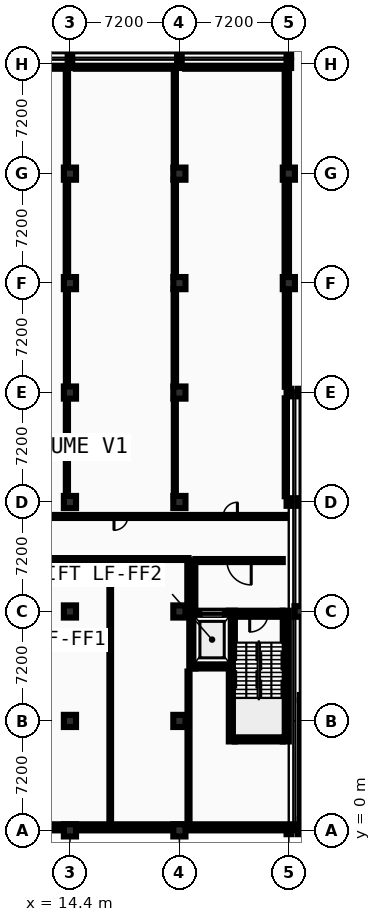
"""IFC4 building model, lengths in metres.
Left out: names, types, materials, properties, quantities, classifications, styles, units other than length and angle.
Written with IfcOpenShell. Run it as: python <this file> out.ifc"""

import sys

from ifc_helpers import new_model, si_unit, direction, frame, frame_2d, origin, origin_2d, place, context, subcontext, project, spatial, rectangle, i_section, extrude, element, fill, save


model = new_model("IFC4")
c1 = context("Model", 3, precision=1e-05, world=origin(), true_north=direction((0.0, 1.0)))
c2 = subcontext(c1, "Body", "Model", "MODEL_VIEW")
j1 = project(units=[si_unit("LENGTHUNIT", "METRE"), si_unit("PLANEANGLEUNIT", "RADIAN")], contexts=[c1])
p1 = place(None, origin())
s1 = spatial("IfcSite", under=j1, at=p1, CompositionType="ELEMENT")
p2 = place(p1, origin())
s2 = spatial("IfcBuilding", under=s1, at=p2, CompositionType="ELEMENT")
p3 = place(p2, frame((0.0, 0.0, -4.8)))
s3 = spatial("IfcBuildingStorey", under=s2, at=p3, CompositionType="ELEMENT", Elevation=-4.8)
for number, where, z_axis, x_axis in (
    (1, (14.4, 0.0, 0.0), (0.0, 0.0, 1.0), (1.0, 0.0, 0.0)),
    (2, (14.4, 7.2, 0.0), (0.0, 0.0, 1.0), (1.0, 0.0, 0.0)),
    (3, (14.4, 14.4, 0.0), (0.0, 0.0, 1.0), (1.0, 0.0, 0.0)),
    (4, (14.4, 21.6, 0.0), (0.0, 0.0, 1.0), (1.0, 0.0, 0.0)),
    (5, (14.4, 28.8, 0.0), (0.0, 0.0, 1.0), (1.0, 0.0, 0.0)),
    (6, (14.4, 36.0, 0.0), (0.0, 0.0, 1.0), (1.0, 0.0, 0.0)),
    (7, (14.4, 43.2, 0.0), (0.0, 0.0, 1.0), (1.0, 0.0, 0.0)),
):
    element("IfcColumn", number, at=place(p3, frame(where, z_axis=z_axis, x_axis=x_axis)), inside=s3, PredefinedType="COLUMN", context=c2, shape_type="SweptSolid", body=[
        extrude(rectangle(XDim=0.8, YDim=0.8, at=origin_2d()), origin(), (0.0, 0.0, 1.0), 4.8),
    ])
for number, where, z_axis, x_axis in (
    (8, (14.4, 50.4, 0.0), (0.0, 0.0, 1.0), (1.0, 0.0, 0.0)),
    (9, (14.4, 51.12, 0.0), (0.0, 0.0, 1.0), (1.0, 0.0, 0.0)),
):
    element("IfcColumn", number, at=place(p3, frame(where, z_axis=z_axis, x_axis=x_axis)), inside=s3, PredefinedType="COLUMN", context=c2, shape_type="SweptSolid", body=[
        extrude(i_section(OverallWidth=0.3, OverallDepth=0.5, WebThickness=0.014, FlangeThickness=0.028, FilletRadius=0.027, at=origin_2d()), origin(), (0.0, 0.0, 1.0), 4.8),
    ])
for number, where, z_axis, x_axis in (
    (10, (21.6, 0.0, 0.0), (0.0, 0.0, 1.0), (1.0, 0.0, 0.0)),
    (11, (21.6, 7.2, 0.0), (0.0, 0.0, 1.0), (1.0, 0.0, 0.0)),
    (12, (21.6, 14.4, 0.0), (0.0, 0.0, 1.0), (1.0, 0.0, 0.0)),
    (13, (21.6, 21.6, 0.0), (0.0, 0.0, 1.0), (1.0, 0.0, 0.0)),
    (14, (21.6, 28.8, 0.0), (0.0, 0.0, 1.0), (1.0, 0.0, 0.0)),
    (15, (21.6, 36.0, 0.0), (0.0, 0.0, 1.0), (1.0, 0.0, 0.0)),
    (16, (21.6, 43.2, 0.0), (0.0, 0.0, 1.0), (1.0, 0.0, 0.0)),
):
    element("IfcColumn", number, at=place(p3, frame(where, z_axis=z_axis, x_axis=x_axis)), inside=s3, PredefinedType="COLUMN", context=c2, shape_type="SweptSolid", body=[
        extrude(rectangle(XDim=0.8, YDim=0.8, at=origin_2d()), origin(), (0.0, 0.0, 1.0), 4.8),
    ])
for number, where, z_axis, x_axis in (
    (17, (21.6, 50.4, 0.0), (0.0, 0.0, 1.0), (1.0, 0.0, 0.0)),
    (18, (21.6, 51.12, 0.0), (0.0, 0.0, 1.0), (1.0, 0.0, 0.0)),
    (19, (28.8, 0.0, 0.0), (0.0, 0.0, 1.0), (1.0, 0.0, 0.0)),
    (20, (28.8, 21.6, 0.0), (0.0, 0.0, 1.0), (1.0, 0.0, 0.0)),
    (21, (28.8, 28.8, 0.0), (0.0, 0.0, 1.0), (1.0, 0.0, 0.0)),
):
    element("IfcColumn", number, at=place(p3, frame(where, z_axis=z_axis, x_axis=x_axis)), inside=s3, PredefinedType="COLUMN", context=c2, shape_type="SweptSolid", body=[
        extrude(i_section(OverallWidth=0.3, OverallDepth=0.5, WebThickness=0.014, FlangeThickness=0.028, FilletRadius=0.027, at=origin_2d()), origin(), (0.0, 0.0, 1.0), 4.8),
    ])
for number, where, z_axis, x_axis in (
    (22, (28.8, 36.0, 0.0), (0.0, 0.0, 1.0), (1.0, 0.0, 0.0)),
    (23, (28.8, 43.2, 0.0), (0.0, 0.0, 1.0), (1.0, 0.0, 0.0)),
):
    element("IfcColumn", number, at=place(p3, frame(where, z_axis=z_axis, x_axis=x_axis)), inside=s3, PredefinedType="COLUMN", context=c2, shape_type="SweptSolid", body=[
        extrude(rectangle(XDim=0.8, YDim=0.8, at=origin_2d()), origin(), (0.0, 0.0, 1.0), 4.8),
    ])
for number, where, z_axis, x_axis in (
    (24, (28.8, 50.4, 0.0), (0.0, 0.0, 1.0), (1.0, 0.0, 0.0)),
    (25, (28.8, 51.12, 0.0), (0.0, 0.0, 1.0), (1.0, 0.0, 0.0)),
    (26, (29.52, 0.0, 0.0), (0.0, 0.0, 1.0), (1.0, 0.0, 0.0)),
):
    element("IfcColumn", number, at=place(p3, frame(where, z_axis=z_axis, x_axis=x_axis)), inside=s3, PredefinedType="COLUMN", context=c2, shape_type="SweptSolid", body=[
        extrude(i_section(OverallWidth=0.3, OverallDepth=0.5, WebThickness=0.014, FlangeThickness=0.028, FilletRadius=0.027, at=origin_2d()), origin(), (0.0, 0.0, 1.0), 4.8),
    ])
p4 = place(p3, frame((29.52, 14.4, 0.0), z_axis=(0.0, 0.0, 1.0), x_axis=(1.0, 0.0, 0.0)))
e27 = element("IfcColumn", 27, at=p4, inside=s3, PredefinedType="COLUMN", context=c2, shape_type="SweptSolid", body=[
    extrude(rectangle(XDim=0.7, YDim=0.7, at=origin_2d()), origin(), (0.0, 0.0, 1.0), 4.8),
])
for number, where, z_axis, x_axis in (
    (28, (29.52, 21.6, 0.0), (0.0, 0.0, 1.0), (1.0, 0.0, 0.0)),
    (29, (29.52, 28.8, 0.0), (0.0, 0.0, 1.0), (1.0, 0.0, 0.0)),
):
    element("IfcColumn", number, at=place(p3, frame(where, z_axis=z_axis, x_axis=x_axis)), inside=s3, PredefinedType="COLUMN", context=c2, shape_type="SweptSolid", body=[
        extrude(i_section(OverallWidth=0.3, OverallDepth=0.5, WebThickness=0.014, FlangeThickness=0.028, FilletRadius=0.027, at=origin_2d()), origin(), (0.0, 0.0, 1.0), 4.8),
    ])
p5 = place(p3, frame((0.0, 0.2, 0.0), z_axis=(0.0, 0.0, 1.0), x_axis=(1.0, 0.0, 0.0)))
e30 = element("IfcWall", 30, at=p5, inside=s3, PredefinedType="USERDEFINED", context=c2, shape_type="SweptSolid", body=[
    extrude(rectangle(XDim=86.4, YDim=0.4, at=frame_2d((43.2, 0.0))), origin(), (0.0, 0.0, 1.0), 4.545),
])
p6 = place(p3, frame((25.25, 6.05, 0.0), z_axis=(0.0, 0.0, 1.0), x_axis=(1.0, 0.0, 0.0)))
e31 = element("IfcWall", 31, at=p6, inside=s3, PredefinedType="SHEAR", context=c2, shape_type="SweptSolid", body=[
    extrude(rectangle(XDim=3.15, YDim=0.4, at=frame_2d((1.575, 0.0))), origin(), (0.0, 0.0, 1.0), 4.545),
])
p7 = place(p3, frame((25.25, 14.25, 0.0), z_axis=(0.0, 0.0, 1.0), x_axis=(1.0, 0.0, 0.0)))
e32 = element("IfcWall", 32, at=p7, inside=s3, PredefinedType="SHEAR", context=c2, shape_type="SweptSolid", body=[
    extrude(rectangle(XDim=3.15, YDim=0.4, at=frame_2d((1.575, 0.0))), origin(), (0.0, 0.0, 1.0), 4.545),
])
p8 = place(p7, frame((0.975, 0.0, 0.0)))
e33 = element("IfcOpeningElement", 33, at=p8, cuts=e32, PredefinedType="OPENING", context=c2, shape_type="SweptSolid", body=[
    extrude(rectangle(XDim=1.2, YDim=2.15, at=frame_2d((0.6, 1.075))), frame((0.0, 0.21, 0.0), z_axis=(0.0, -1.0, 0.0), x_axis=(1.0, 0.0, 0.0)), (0.0, 0.0, 1.0), 0.42),
])
for number, where, z_axis, x_axis in (
    (34, (25.05, 5.85, 0.0), (0.0, 0.0, 1.0), (0.0, 1.0, 0.0)),
    (35, (28.6, 5.85, 0.0), (0.0, 0.0, 1.0), (0.0, 1.0, 0.0)),
):
    element("IfcWall", number, at=place(p3, frame(where, z_axis=z_axis, x_axis=x_axis)), inside=s3, PredefinedType="SHEAR", context=c2, shape_type="SweptSolid", body=[
        extrude(rectangle(XDim=8.6, YDim=0.4, at=frame_2d((4.3, 0.0))), origin(), (0.0, 0.0, 1.0), 4.545),
    ])
p9 = place(p3, frame((22.65, 10.85, 0.0), z_axis=(0.0, 0.0, 1.0), x_axis=(1.0, 0.0, 0.0)))
e36 = element("IfcWall", 36, at=p9, inside=s3, PredefinedType="SHEAR", context=c2, shape_type="SweptSolid", body=[
    extrude(rectangle(XDim=2.2, YDim=0.4, at=frame_2d((1.1, 0.0))), origin(), (0.0, 0.0, 1.0), 4.545),
])
p10 = place(p3, frame((22.65, 14.25, 0.0), z_axis=(0.0, 0.0, 1.0), x_axis=(1.0, 0.0, 0.0)))
e37 = element("IfcWall", 37, at=p10, inside=s3, PredefinedType="SHEAR", context=c2, shape_type="SweptSolid", body=[
    extrude(rectangle(XDim=2.2, YDim=0.4, at=frame_2d((1.1, 0.0))), origin(), (0.0, 0.0, 1.0), 4.545),
])
p11 = place(p10, frame((0.4, 0.0, 0.0)))
e38 = element("IfcOpeningElement", 38, at=p11, cuts=e37, PredefinedType="OPENING", context=c2, shape_type="SweptSolid", body=[
    extrude(rectangle(XDim=1.4, YDim=2.2, at=frame_2d((0.7, 1.1))), frame((0.0, 0.21, 0.0), z_axis=(0.0, -1.0, 0.0), x_axis=(1.0, 0.0, 0.0)), (0.0, 0.0, 1.0), 0.42),
])
p12 = place(p3, frame((22.45, 10.65, 0.0), z_axis=(0.0, 0.0, 1.0), x_axis=(0.0, 1.0, 0.0)))
e39 = element("IfcWall", 39, at=p12, inside=s3, PredefinedType="SHEAR", context=c2, shape_type="SweptSolid", body=[
    extrude(rectangle(XDim=3.8, YDim=0.4, at=frame_2d((1.9, 0.0))), origin(), (0.0, 0.0, 1.0), 4.545),
])
p13 = place(p3, frame((22.65, 17.75, 0.0), z_axis=(0.0, 0.0, 1.0), x_axis=(1.0, 0.0, 0.0)))
e40 = element("IfcWall", 40, at=p13, inside=s3, PredefinedType="PARTITIONING", context=c2, shape_type="SweptSolid", body=[
    extrude(rectangle(XDim=5.75, YDim=0.2, at=frame_2d((2.875, 0.0))), origin(), (0.0, 0.0, 1.0), 4.545),
])
p14 = place(p13, frame((2.075, 0.0, 0.0)))
e41 = element("IfcOpeningElement", 41, at=p14, cuts=e40, PredefinedType="OPENING", context=c2, shape_type="SweptSolid", body=[
    extrude(rectangle(XDim=1.6, YDim=2.2, at=frame_2d((0.8, 1.1))), frame((0.0, 0.11, 0.0), z_axis=(0.0, -1.0, 0.0), x_axis=(1.0, 0.0, 0.0)), (0.0, 0.0, 1.0), 0.22),
])
p15 = place(p3, frame((22.55, 14.45, 0.0), z_axis=(0.0, 0.0, 1.0), x_axis=(0.0, 1.0, 0.0)))
e42 = element("IfcWall", 42, at=p15, inside=s3, PredefinedType="PARTITIONING", context=c2, shape_type="SweptSolid", body=[
    extrude(rectangle(XDim=3.2, YDim=0.2, at=frame_2d((1.6, 0.0))), origin(), (0.0, 0.0, 1.0), 4.545),
])
p16 = place(p3, frame((29.52, 0.575, 0.0), z_axis=(0.0, 0.0, 1.0), x_axis=(1.0, 0.0, 0.0)))
e43 = element("IfcWall", 43, at=p16, inside=s3, PredefinedType="SHEAR", context=c2, shape_type="SweptSolid", body=[
    extrude(rectangle(XDim=3.85, YDim=0.35, at=frame_2d((1.925, 0.0))), origin(), (0.0, 0.0, 1.0), 4.545),
])
p17 = place(p3, frame((29.52, 8.725, 0.0), z_axis=(0.0, 0.0, 1.0), x_axis=(1.0, 0.0, 0.0)))
e44 = element("IfcWall", 44, at=p17, inside=s3, PredefinedType="SHEAR", context=c2, shape_type="SweptSolid", body=[
    extrude(rectangle(XDim=3.85, YDim=0.35, at=frame_2d((1.925, 0.0))), origin(), (0.0, 0.0, 1.0), 4.545),
])
p18 = place(p17, frame((1.375, 0.0, 0.0)))
e45 = element("IfcOpeningElement", 45, at=p18, cuts=e44, PredefinedType="OPENING", context=c2, shape_type="SweptSolid", body=[
    extrude(rectangle(XDim=1.1, YDim=2.15, at=frame_2d((0.55, 1.075))), frame((0.0, 0.185, 0.0), z_axis=(0.0, -1.0, 0.0), x_axis=(1.0, 0.0, 0.0)), (0.0, 0.0, 1.0), 0.37),
])
p19 = place(p3, frame((29.695, 0.75, 0.0), z_axis=(0.0, 0.0, 1.0), x_axis=(0.0, 1.0, 0.0)))
e46 = element("IfcWall", 46, at=p19, inside=s3, PredefinedType="SHEAR", context=c2, shape_type="SweptSolid", body=[
    extrude(rectangle(XDim=7.8, YDim=0.35, at=frame_2d((3.9, 0.0))), origin(), (0.0, 0.0, 1.0), 4.545),
])
p20 = place(p3, frame((9.45, 17.85, 0.0), z_axis=(0.0, 0.0, 1.0), x_axis=(1.0, 0.0, 0.0)))
e47 = element("IfcWall", 47, at=p20, inside=s3, PredefinedType="PARTITIONING", context=c2, shape_type="SweptSolid", body=[
    extrude(rectangle(XDim=12.75, YDim=0.125, at=frame_2d((6.375, 0.0))), origin(), (0.0, 0.0, 1.0), 4.545),
])
p21 = place(p20, frame((1.225, 0.0, 0.0)))
e48 = element("IfcOpeningElement", 48, at=p21, cuts=e47, PredefinedType="OPENING", context=c2, shape_type="SweptSolid", body=[
    extrude(rectangle(XDim=1.0, YDim=2.1, at=frame_2d((0.5, 1.05))), frame((0.0, 0.073, 0.0), z_axis=(0.0, -1.0, 0.0), x_axis=(1.0, 0.0, 0.0)), (0.0, 0.0, 1.0), 0.145),
])
p22 = place(p20, frame((6.25, 0.0, 0.0)))
e49 = element("IfcOpeningElement", 49, at=p22, cuts=e47, PredefinedType="OPENING", context=c2, shape_type="SweptSolid", body=[
    extrude(rectangle(XDim=0.9, YDim=2.1, at=frame_2d((0.45, 1.05))), frame((0.0, 0.073, 0.0), z_axis=(0.0, -1.0, 0.0), x_axis=(1.0, 0.0, 0.0)), (0.0, 0.0, 1.0), 0.145),
])
p23 = place(p20, frame((8.05, 0.0, 0.0)))
e50 = element("IfcOpeningElement", 50, at=p23, cuts=e47, PredefinedType="OPENING", context=c2, shape_type="SweptSolid", body=[
    extrude(rectangle(XDim=0.88, YDim=2.04, at=frame_2d((0.44, 1.02))), frame((0.0, 0.073, 0.0), z_axis=(0.0, -1.0, 0.0), x_axis=(1.0, 0.0, 0.0)), (0.0, 0.0, 1.0), 0.145),
])
p24 = place(p3, frame((0.42, 20.65, 0.0), z_axis=(0.0, 0.0, 1.0), x_axis=(1.0, 0.0, 0.0)))
e51 = element("IfcWall", 51, at=p24, inside=s3, PredefinedType="PARTITIONING", context=c2, shape_type="SweptSolid", body=[
    extrude(rectangle(XDim=28.18, YDim=0.2, at=frame_2d((14.09, 0.0))), origin(), (0.0, 0.0, 1.0), 4.545),
])
p25 = place(p24, frame((0.665, 0.0, 0.0)))
e52 = element("IfcOpeningElement", 52, at=p25, cuts=e51, PredefinedType="OPENING", context=c2, shape_type="SweptSolid", body=[
    extrude(rectangle(XDim=1.8, YDim=2.3, at=frame_2d((0.9, 1.15))), frame((0.0, 0.11, 0.0), z_axis=(0.0, -1.0, 0.0), x_axis=(1.0, 0.0, 0.0)), (0.0, 0.0, 1.0), 0.22),
])
p26 = place(p24, frame((9.48, 0.0, 0.0)))
e53 = element("IfcOpeningElement", 53, at=p26, cuts=e51, PredefinedType="OPENING", context=c2, shape_type="SweptSolid", body=[
    extrude(rectangle(XDim=1.8, YDim=2.3, at=frame_2d((0.9, 1.15))), frame((0.0, 0.11, 0.0), z_axis=(0.0, -1.0, 0.0), x_axis=(1.0, 0.0, 0.0)), (0.0, 0.0, 1.0), 0.22),
])
p27 = place(p24, frame((3.58, 0.0, 0.0)))
e54 = element("IfcOpeningElement", 54, at=p27, cuts=e51, PredefinedType="OPENING", context=c2, shape_type="SweptSolid", body=[
    extrude(rectangle(XDim=1.8, YDim=2.3, at=frame_2d((0.9, 1.15))), frame((0.0, 0.11, 0.0), z_axis=(0.0, -1.0, 0.0), x_axis=(1.0, 0.0, 0.0)), (0.0, 0.0, 1.0), 0.22),
])
p28 = place(p24, frame((16.877, 0.0, 0.0)))
e55 = element("IfcOpeningElement", 55, at=p28, cuts=e51, PredefinedType="OPENING", context=c2, shape_type="SweptSolid", body=[
    extrude(rectangle(XDim=0.906, YDim=2.04, at=frame_2d((0.453, 1.02))), frame((0.0, 0.11, 0.0), z_axis=(0.0, -1.0, 0.0), x_axis=(1.0, 0.0, 0.0)), (0.0, 0.0, 1.0), 0.22),
])
p29 = place(p24, frame((24.064, 0.0, 0.0)))
e56 = element("IfcOpeningElement", 56, at=p29, cuts=e51, PredefinedType="OPENING", context=c2, shape_type="SweptSolid", body=[
    extrude(rectangle(XDim=0.932, YDim=2.04, at=frame_2d((0.466, 1.02))), frame((0.0, 0.11, 0.0), z_axis=(0.0, -1.0, 0.0), x_axis=(1.0, 0.0, 0.0)), (0.0, 0.0, 1.0), 0.22),
])
for number, where, z_axis, x_axis in (
    (57, (7.58, 50.2, 0.0), (0.0, 0.0, 1.0), (1.0, 0.0, 0.0)),
    (58, (14.78, 50.2, 0.0), (0.0, 0.0, 1.0), (1.0, 0.0, 0.0)),
    (59, (21.98, 50.2, 0.0), (0.0, 0.0, 1.0), (1.0, 0.0, 0.0)),
):
    element("IfcWall", number, at=place(p3, frame(where, z_axis=z_axis, x_axis=x_axis)), inside=s3, PredefinedType="PARTITIONING", context=c2, shape_type="SweptSolid", body=[
        extrude(rectangle(XDim=6.44, YDim=0.2, at=frame_2d((3.22, 0.0))), origin(), (0.0, 0.0, 1.0), 4.095),
    ])
p30 = place(p3, frame((14.2, 21.98, 0.0), z_axis=(0.0, 0.0, 1.0), x_axis=(0.0, 1.0, 0.0)))
e60 = element("IfcWall", 60, at=p30, inside=s3, PredefinedType="PARTITIONING", context=c2, shape_type="SweptSolid", body=[
    extrude(rectangle(XDim=6.44, YDim=0.142, at=frame_2d((3.22, 0.0))), origin(), (0.0, 0.0, 1.0), 4.245),
])
p31 = place(p3, frame((14.2, 29.18, 0.0), z_axis=(0.0, 0.0, 1.0), x_axis=(0.0, 1.0, 0.0)))
e61 = element("IfcWall", 61, at=p31, inside=s3, PredefinedType="PARTITIONING", context=c2, shape_type="SweptSolid", body=[
    extrude(rectangle(XDim=6.44, YDim=0.135, at=frame_2d((3.22, 0.0))), origin(), (0.0, 0.0, 1.0), 4.245),
])
p32 = place(p3, frame((14.2, 36.38, 0.0), z_axis=(0.0, 0.0, 1.0), x_axis=(0.0, 1.0, 0.0)))
e62 = element("IfcWall", 62, at=p32, inside=s3, PredefinedType="PARTITIONING", context=c2, shape_type="SweptSolid", body=[
    extrude(rectangle(XDim=6.44, YDim=0.16, at=frame_2d((3.22, 0.0))), origin(), (0.0, 0.0, 1.0), 4.245),
])
p33 = place(p3, frame((14.2, 43.58, 0.0), z_axis=(0.0, 0.0, 1.0), x_axis=(0.0, 1.0, 0.0)))
e63 = element("IfcWall", 63, at=p33, inside=s3, PredefinedType="PARTITIONING", context=c2, shape_type="SweptSolid", body=[
    extrude(rectangle(XDim=6.44, YDim=0.15, at=frame_2d((3.22, 0.0))), origin(), (0.0, 0.0, 1.0), 4.245),
])
p34 = place(p3, frame((17.05, 0.4, 0.0), z_axis=(0.0, 0.0, 1.0), x_axis=(0.0, 1.0, 0.0)))
e64 = element("IfcWall", 64, at=p34, inside=s3, PredefinedType="PARTITIONING", context=c2, shape_type="SweptSolid", body=[
    extrude(rectangle(XDim=17.388, YDim=0.11, at=frame_2d((8.694, 0.0))), origin(), (0.0, 0.0, 1.0), 4.545),
])
p35 = place(p3, frame((21.3, 21.98, 0.0), z_axis=(0.0, 0.0, 1.0), x_axis=(0.0, 1.0, 0.0)))
e65 = element("IfcWall", 65, at=p35, inside=s3, PredefinedType="PARTITIONING", context=c2, shape_type="SweptSolid", body=[
    extrude(rectangle(XDim=6.44, YDim=0.135, at=frame_2d((3.22, 0.0))), origin(), (0.0, 0.0, 1.0), 4.545),
])
p36 = place(p3, frame((21.3, 29.18, 0.0), z_axis=(0.0, 0.0, 1.0), x_axis=(0.0, 1.0, 0.0)))
e66 = element("IfcWall", 66, at=p36, inside=s3, PredefinedType="PARTITIONING", context=c2, shape_type="SweptSolid", body=[
    extrude(rectangle(XDim=6.44, YDim=0.16, at=frame_2d((3.22, 0.0))), origin(), (0.0, 0.0, 1.0), 4.245),
])
p37 = place(p3, frame((21.3, 36.38, 0.0), z_axis=(0.0, 0.0, 1.0), x_axis=(0.0, 1.0, 0.0)))
e67 = element("IfcWall", 67, at=p37, inside=s3, PredefinedType="PARTITIONING", context=c2, shape_type="SweptSolid", body=[
    extrude(rectangle(XDim=6.44, YDim=0.15, at=frame_2d((3.22, 0.0))), origin(), (0.0, 0.0, 1.0), 4.245),
])
p38 = place(p3, frame((21.3, 43.58, 0.0), z_axis=(0.0, 0.0, 1.0), x_axis=(0.0, 1.0, 0.0)))
e68 = element("IfcWall", 68, at=p38, inside=s3, PredefinedType="PARTITIONING", context=c2, shape_type="SweptSolid", body=[
    extrude(rectangle(XDim=6.44, YDim=0.142, at=frame_2d((3.22, 0.0))), origin(), (0.0, 0.0, 1.0), 4.245),
])
p39 = place(p3, frame((22.2, 0.4, 0.0), z_axis=(0.0, 0.0, 1.0), x_axis=(0.0, 1.0, 0.0)))
e69 = element("IfcWall", 69, at=p39, inside=s3, PredefinedType="PARTITIONING", context=c2, shape_type="SweptSolid", body=[
    extrude(rectangle(XDim=10.05, YDim=0.135, at=frame_2d((5.025, 0.0))), origin(), (0.0, 0.0, 1.0), 4.545),
])
p40 = place(p3, frame((22.2, 14.65, 0.0), z_axis=(0.0, 0.0, 1.0), x_axis=(0.0, 1.0, 0.0)))
e70 = element("IfcWall", 70, at=p40, inside=s3, PredefinedType="PARTITIONING", context=c2, shape_type="SweptSolid", body=[
    extrude(rectangle(XDim=3.138, YDim=0.16, at=frame_2d((1.569, 0.0))), origin(), (0.0, 0.0, 1.0), 4.545),
])
p41 = place(p3, frame((28.6, 21.98, 0.0), z_axis=(0.0, 0.0, 1.0), x_axis=(0.0, 1.0, 0.0)))
e71 = element("IfcWall", 71, at=p41, inside=s3, PredefinedType="PARTITIONING", context=c2, shape_type="SweptSolid", body=[
    extrude(rectangle(XDim=6.44, YDim=0.142, at=frame_2d((3.22, 0.0))), origin(), (0.0, 0.0, 1.0), 4.245),
])
p42 = place(p3, frame((28.6, 29.18, 0.0), z_axis=(0.0, 0.0, 1.0), x_axis=(0.0, 1.0, 0.0)))
e72 = element("IfcWall", 72, at=p42, inside=s3, PredefinedType="PARTITIONING", context=c2, shape_type="SweptSolid", body=[
    extrude(rectangle(XDim=6.44, YDim=0.135, at=frame_2d((3.22, 0.0))), origin(), (0.0, 0.0, 1.0), 4.245),
])
p43 = place(p3, frame((28.6, 36.38, 0.0), z_axis=(0.0, 0.0, 1.0), x_axis=(0.0, 1.0, 0.0)))
e73 = element("IfcWall", 73, at=p43, inside=s3, PredefinedType="PARTITIONING", context=c2, shape_type="SweptSolid", body=[
    extrude(rectangle(XDim=6.44, YDim=0.16, at=frame_2d((3.22, 0.0))), origin(), (0.0, 0.0, 1.0), 4.245),
])
p44 = place(p3, frame((28.6, 43.58, 0.0), z_axis=(0.0, 0.0, 1.0), x_axis=(0.0, 1.0, 0.0)))
e74 = element("IfcWall", 74, at=p44, inside=s3, PredefinedType="PARTITIONING", context=c2, shape_type="SweptSolid", body=[
    extrude(rectangle(XDim=6.44, YDim=0.15, at=frame_2d((3.22, 0.0))), origin(), (0.0, 0.0, 1.0), 4.245),
])
p45 = place(p8, frame((1.2, 0.0, 0.0), z_axis=(0.0, 0.0, 1.0), x_axis=(-1.0, 0.0, 0.0)))
e75 = element("IfcDoor", 75, at=p45, inside=s3, OperationType="SINGLE_SWING_LEFT", PredefinedType="DOOR", context=c2, shape_type="SweptSolid", body=[
    extrude(rectangle(XDim=1.2, YDim=2.15, at=frame_2d((0.6, 1.075))), frame((0.0, 0.025, 0.0), z_axis=(0.0, -1.0, 0.0), x_axis=(1.0, 0.0, 0.0)), (0.0, 0.0, 1.0), 0.05),
])
fill(e33, e75)
p46 = place(p11, origin())
e76 = element("IfcDoor", 76, at=p46, inside=s3, OperationType="SLIDING_TO_LEFT", PredefinedType="DOOR", context=c2, shape_type="SweptSolid", body=[
    extrude(rectangle(XDim=1.4, YDim=2.2, at=frame_2d((0.7, 1.1))), frame((0.0, 0.025, 0.0), z_axis=(0.0, -1.0, 0.0), x_axis=(1.0, 0.0, 0.0)), (0.0, 0.0, 1.0), 0.05),
])
fill(e38, e76)
p47 = place(p14, origin())
e77 = element("IfcDoor", 77, at=p47, inside=s3, OperationType="DOUBLE_DOOR_SINGLE_SWING", PredefinedType="DOOR", context=c2, shape_type="SweptSolid", body=[
    extrude(rectangle(XDim=1.6, YDim=2.2, at=frame_2d((0.8, 1.1))), frame((0.0, 0.025, 0.0), z_axis=(0.0, -1.0, 0.0), x_axis=(1.0, 0.0, 0.0)), (0.0, 0.0, 1.0), 0.05),
])
fill(e41, e77)
p48 = place(p22, origin())
e78 = element("IfcDoor", 78, at=p48, inside=s3, OperationType="SINGLE_SWING_RIGHT", PredefinedType="DOOR", context=c2, shape_type="SweptSolid", body=[
    extrude(rectangle(XDim=0.9, YDim=2.1, at=frame_2d((0.45, 1.05))), frame((0.0, 0.025, 0.0), z_axis=(0.0, -1.0, 0.0), x_axis=(1.0, 0.0, 0.0)), (0.0, 0.0, 1.0), 0.05),
])
fill(e49, e78)
p49 = place(p23, origin())
e79 = element("IfcDoor", 79, at=p49, inside=s3, OperationType="SINGLE_SWING_RIGHT", PredefinedType="DOOR", context=c2, shape_type="SweptSolid", body=[
    extrude(rectangle(XDim=0.88, YDim=2.04, at=frame_2d((0.44, 1.02))), frame((0.0, 0.025, 0.0), z_axis=(0.0, -1.0, 0.0), x_axis=(1.0, 0.0, 0.0)), (0.0, 0.0, 1.0), 0.05),
])
fill(e50, e79)
p50 = place(p28, frame((0.906, 0.0, 0.0), z_axis=(0.0, 0.0, 1.0), x_axis=(-1.0, 0.0, 0.0)))
e80 = element("IfcDoor", 80, at=p50, inside=s3, OperationType="SINGLE_SWING_LEFT", PredefinedType="DOOR", context=c2, shape_type="SweptSolid", body=[
    extrude(rectangle(XDim=0.906, YDim=2.04, at=frame_2d((0.453, 1.02))), frame((0.0, 0.025, 0.0), z_axis=(0.0, -1.0, 0.0), x_axis=(1.0, 0.0, 0.0)), (0.0, 0.0, 1.0), 0.05),
])
fill(e55, e80)
p51 = place(p29, frame((0.932, 0.0, 0.0), z_axis=(0.0, 0.0, 1.0), x_axis=(-1.0, 0.0, 0.0)))
e81 = element("IfcDoor", 81, at=p51, inside=s3, OperationType="SINGLE_SWING_RIGHT", PredefinedType="DOOR", context=c2, shape_type="SweptSolid", body=[
    extrude(rectangle(XDim=0.932, YDim=2.04, at=frame_2d((0.466, 1.02))), frame((0.0, 0.025, 0.0), z_axis=(0.0, -1.0, 0.0), x_axis=(1.0, 0.0, 0.0)), (0.0, 0.0, 1.0), 0.05),
])
fill(e56, e81)
save(model, sys.argv[1])
